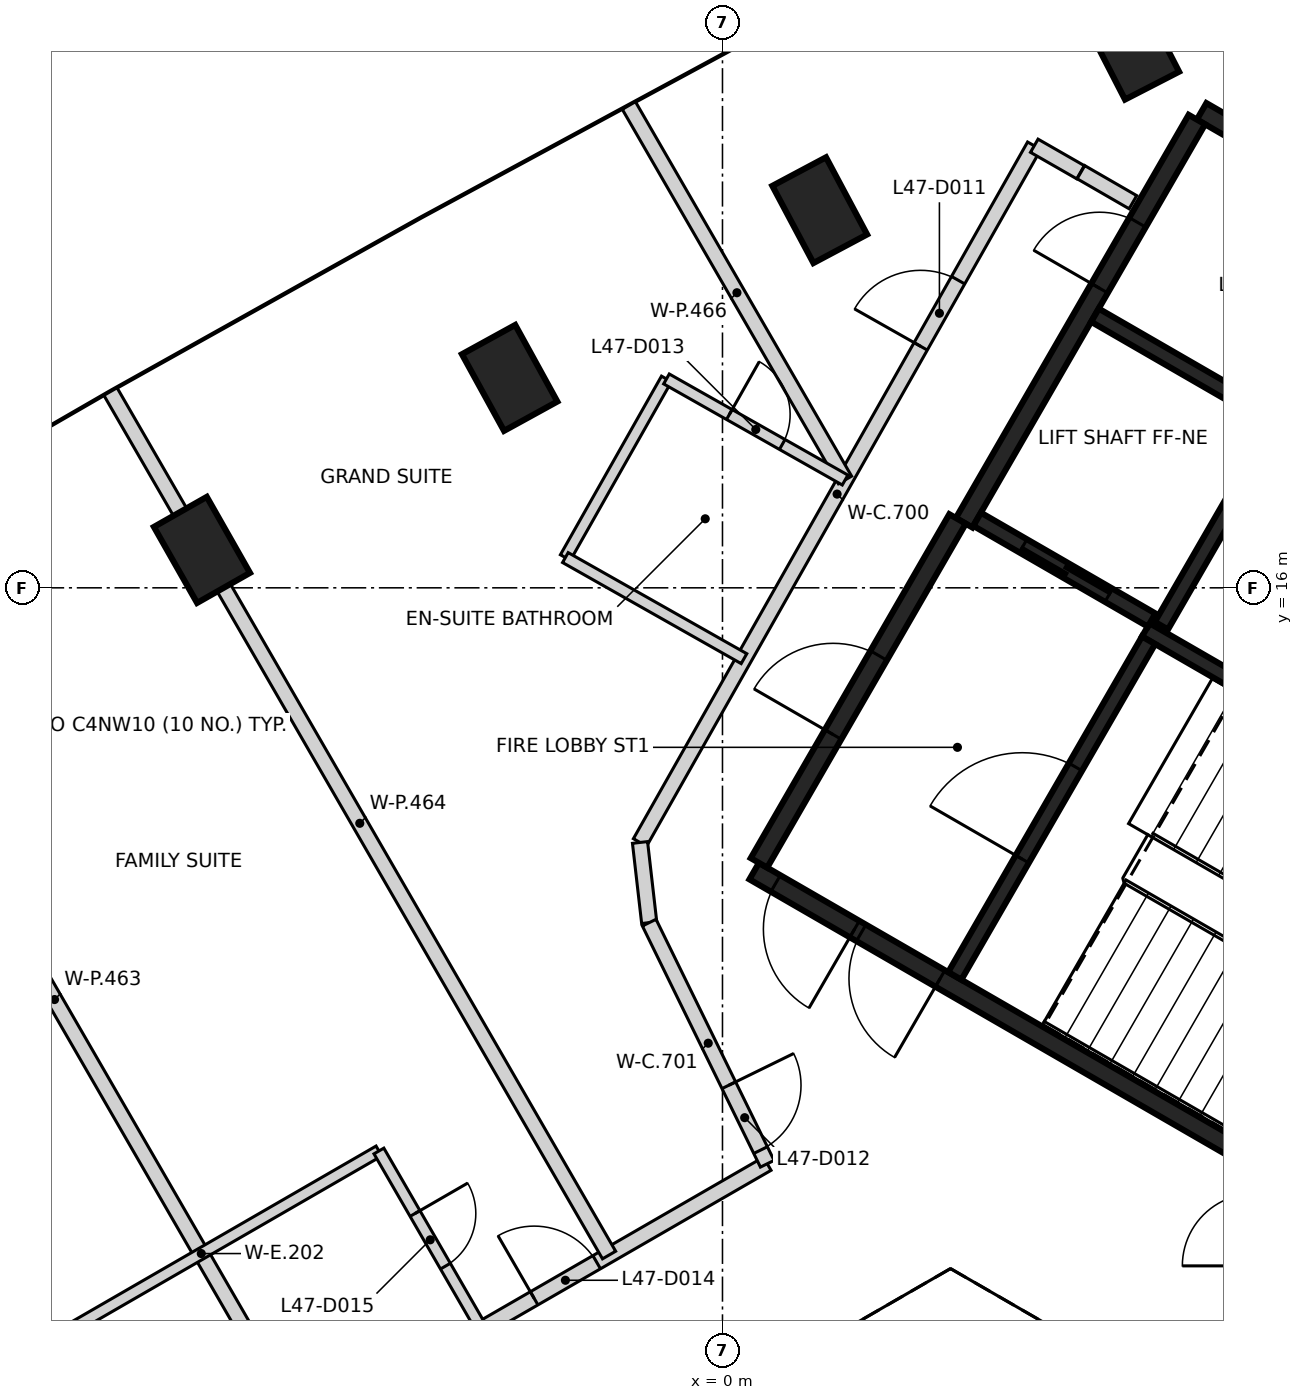
"""IFC4 building model, lengths in metres.
Left out: names, types, materials, properties, quantities, classifications, styles, units other than length and angle.
Written with IfcOpenShell. Run it as: python <this file> out.ifc"""

import sys

from ifc_helpers import new_model, si_unit, direction, frame, frame_2d, origin, origin_2d, place, context, subcontext, project, spatial, rectangle, extrude, element, fill, save


model = new_model("IFC4")
c1 = context("Model", 3, precision=1e-05, world=origin(), true_north=direction((0.0, 1.0)))
c2 = subcontext(c1, "Body", "Model", "MODEL_VIEW")
j1 = project(units=[si_unit("LENGTHUNIT", "METRE"), si_unit("PLANEANGLEUNIT", "RADIAN")], contexts=[c1])
p1 = place(None, origin())
s1 = spatial("IfcSite", under=j1, at=p1, CompositionType="ELEMENT")
p2 = place(p1, origin())
s2 = spatial("IfcBuilding", under=s1, at=p2, CompositionType="ELEMENT")
p3 = place(p2, frame((0.0, 0.0, 190.0)))
s3 = spatial("IfcBuildingStorey", under=s2, at=p3, CompositionType="ELEMENT", Elevation=190.0)
for number, where, z_axis, x_axis in (
    (1, (5.388, 23.118, -0.35), (0.0, 0.0, 1.0), (-0.458, 0.889, 0.0)),
    (2, (1.279, 20.968, -0.35), (0.0, 0.0, 1.0), (-0.47, 0.883, 0.0)),
    (3, (-2.8, 18.762, -0.35), (0.0, 0.0, 1.0), (-0.482, 0.876, 0.0)),
    (4, (-6.848, 16.499, -0.35), (0.0, 0.0, 1.0), (-0.494, 0.87, 0.0)),
):
    element("IfcColumn", number, at=place(p3, frame(where, z_axis=z_axis, x_axis=x_axis)), inside=s3, PredefinedType="COLUMN", context=c2, shape_type="SweptSolid", body=[
        extrude(rectangle(XDim=1.15, YDim=0.8, at=origin_2d()), origin(), (0.0, 0.0, 1.0), 3.6),
    ])
p4 = place(p3, frame((10.42, 6.498, 0.0), z_axis=(0.0, 0.0, 1.0), x_axis=(-0.866021906294, 0.500006057782, 0.0)))
e5 = element("IfcWall", 5, at=p4, inside=s3, PredefinedType="SHEAR", context=c2, shape_type="SweptSolid", body=[
    extrude(rectangle(XDim=11.55, YDim=0.25, at=frame_2d((5.775, 0.0))), origin(), (0.0, 0.0, 1.0), 3.25),
])
p5 = place(p4, frame((10.025, 0.0, 0.0)))
e6 = element("IfcOpeningElement", 6, at=p5, cuts=e5, PredefinedType="OPENING", context=c2, shape_type="SweptSolid", body=[
    extrude(rectangle(XDim=1.2, YDim=2.1, at=frame_2d((0.6, 1.05))), frame((0.0, 0.135, 0.0), z_axis=(0.0, -1.0, 0.0), x_axis=(1.0, 0.0, 0.0)), (0.0, 0.0, 1.0), 0.27),
])
p6 = place(p4, frame((8.725, 0.0, 0.0)))
e7 = element("IfcOpeningElement", 7, at=p6, cuts=e5, PredefinedType="OPENING", context=c2, shape_type="SweptSolid", body=[
    extrude(rectangle(XDim=1.2, YDim=2.1, at=frame_2d((0.6, 1.05))), frame((0.0, 0.135, 0.0), z_axis=(0.0, -1.0, 0.0), x_axis=(1.0, 0.0, 0.0)), (0.0, 0.0, 1.0), 0.27),
])
p7 = place(p3, frame((6.304, 22.269, 0.0), z_axis=(0.0, 0.0, 1.0), x_axis=(0.866022959057, -0.500004234368, 0.0)))
e8 = element("IfcWall", 8, at=p7, inside=s3, PredefinedType="SHEAR", context=c2, shape_type="SweptSolid", body=[
    extrude(rectangle(XDim=8.75, YDim=0.25, at=frame_2d((4.375, 0.0))), origin(), (0.0, 0.0, 1.0), 3.25),
])
p8 = place(p3, frame((3.179, 16.856, 0.0), z_axis=(0.0, 0.0, 1.0), x_axis=(0.500001955336, 0.866024274868, 0.0)))
e9 = element("IfcWall", 9, at=p8, inside=s3, PredefinedType="SHEAR", context=c2, shape_type="SweptSolid", body=[
    extrude(rectangle(XDim=6.125, YDim=0.25, at=frame_2d((3.062, 0.0))), origin(), (0.0, 0.0, 1.0), 3.25),
])
p9 = place(p8, frame((3.563, 0.0, 0.0)))
e10 = element("IfcOpeningElement", 10, at=p9, cuts=e9, PredefinedType="OPENING", context=c2, shape_type="SweptSolid", body=[
    extrude(rectangle(XDim=1.0, YDim=2.1, at=frame_2d((0.5, 1.05))), frame((0.0, 0.135, 0.0), z_axis=(0.0, -1.0, 0.0), x_axis=(1.0, 0.0, 0.0)), (0.0, 0.0, 1.0), 0.27),
])
p10 = place(p3, frame((0.48, 12.381, 0.0), z_axis=(0.0, 0.0, 1.0), x_axis=(0.49999885962, 0.866026062182, 0.0)))
e11 = element("IfcWall", 11, at=p10, inside=s3, PredefinedType="SHEAR", context=c2, shape_type="SweptSolid", body=[
    extrude(rectangle(XDim=5.225, YDim=0.25, at=frame_2d((2.612, 0.0))), origin(), (0.0, 0.0, 1.0), 3.25),
])
p11 = place(p10, frame((1.95, 0.0, 0.0)))
e12 = element("IfcOpeningElement", 12, at=p11, cuts=e11, PredefinedType="OPENING", context=c2, shape_type="SweptSolid", body=[
    extrude(rectangle(XDim=1.2, YDim=2.1, at=frame_2d((0.6, 1.05))), frame((0.0, 0.135, 0.0), z_axis=(0.0, -1.0, 0.0), x_axis=(1.0, 0.0, 0.0)), (0.0, 0.0, 1.0), 0.27),
])
p12 = place(p3, frame((10.743, 12.46, 0.0), z_axis=(0.0, 0.0, 1.0), x_axis=(-0.866018848283, 0.500011354289, 0.0)))
e13 = element("IfcWall", 13, at=p12, inside=s3, PredefinedType="SHEAR", context=c2, shape_type="SweptSolid", body=[
    extrude(rectangle(XDim=5.974, YDim=0.2, at=frame_2d((2.987, 0.0))), origin(), (0.0, 0.0, 1.0), 3.25),
])
p13 = place(p3, frame((3.057, 10.895, 0.0), z_axis=(0.0, 0.0, 1.0), x_axis=(0.500027839223, 0.866009330205, 0.0)))
e14 = element("IfcWall", 14, at=p13, inside=s3, PredefinedType="SHEAR", context=c2, shape_type="SweptSolid", body=[
    extrude(rectangle(XDim=5.098, YDim=0.2, at=frame_2d((2.549, 0.0))), origin(), (0.0, 0.0, 1.0), 3.25),
])
p14 = place(p13, frame((1.774, 0.0, 0.0)))
e15 = element("IfcOpeningElement", 15, at=p14, cuts=e14, PredefinedType="OPENING", context=c2, shape_type="SweptSolid", body=[
    extrude(rectangle(XDim=1.4, YDim=2.1, at=frame_2d((0.7, 1.05))), frame((0.0, 0.11, 0.0), z_axis=(0.0, -1.0, 0.0), x_axis=(1.0, 0.0, 0.0)), (0.0, 0.0, 1.0), 0.22),
])
p15 = place(p3, frame((7.324, 18.187, 0.0), z_axis=(0.0, 0.0, 1.0), x_axis=(-0.499967891604, -0.866043940782, 0.0)))
e16 = element("IfcWall", 16, at=p15, inside=s3, PredefinedType="SHEAR", context=c2, shape_type="SweptSolid", body=[
    extrude(rectangle(XDim=3.1, YDim=0.2, at=frame_2d((1.55, 0.0))), origin(), (0.0, 0.0, 1.0), 3.25),
])
p16 = place(p3, frame((5.646, 15.576, 0.0), z_axis=(0.0, 0.0, 1.0), x_axis=(-0.866018407898, 0.500012117035, 0.0)))
e17 = element("IfcWall", 17, at=p16, inside=s3, PredefinedType="SHEAR", context=c2, shape_type="SweptSolid", body=[
    extrude(rectangle(XDim=2.651, YDim=0.2, at=frame_2d((1.325, 0.0))), origin(), (0.0, 0.0, 1.0), 3.25),
])
p17 = place(p16, frame((0.652, 0.0, 0.0)))
e18 = element("IfcOpeningElement", 18, at=p17, cuts=e17, PredefinedType="OPENING", context=c2, shape_type="SweptSolid", body=[
    extrude(rectangle(XDim=1.3, YDim=2.1, at=frame_2d((0.65, 1.05))), frame((0.0, 0.11, 0.0), z_axis=(0.0, -1.0, 0.0), x_axis=(1.0, 0.0, 0.0)), (0.0, 0.0, 1.0), 0.22),
])
p18 = place(p3, frame((7.196, 18.26, 0.0), z_axis=(0.0, 0.0, 1.0), x_axis=(-0.866018407898, 0.500012117035, 0.0)))
e19 = element("IfcWall", 19, at=p18, inside=s3, PredefinedType="SHEAR", context=c2, shape_type="SweptSolid", body=[
    extrude(rectangle(XDim=2.651, YDim=0.2, at=frame_2d((1.325, 0.0))), origin(), (0.0, 0.0, 1.0), 3.25),
])
p19 = place(p3, frame((-10.652, 1.934, 0.0), z_axis=(0.0, 0.0, 1.0), x_axis=(0.866066882415, 0.499928150021, 0.0)))
e20 = element("IfcWall", 20, at=p19, inside=s3, PredefinedType="PARTITIONING", context=c2, shape_type="SweptSolid", body=[
    extrude(rectangle(XDim=12.98, YDim=0.2, at=frame_2d((6.49, 0.0))), origin(), (0.0, 0.0, 1.0), 3.25),
])
p20 = place(p19, frame((9.439, 0.0, 0.0)))
e21 = element("IfcOpeningElement", 21, at=p20, cuts=e20, PredefinedType="OPENING", context=c2, shape_type="SweptSolid", body=[
    extrude(rectangle(XDim=0.95, YDim=2.1, at=frame_2d((0.475, 1.05))), frame((0.0, 0.11, 0.0), z_axis=(0.0, -1.0, 0.0), x_axis=(1.0, 0.0, 0.0)), (0.0, 0.0, 1.0), 0.22),
])
p21 = place(p19, frame((0.229, 0.0, 0.0)))
e22 = element("IfcOpeningElement", 22, at=p21, cuts=e20, PredefinedType="OPENING", context=c2, shape_type="SweptSolid", body=[
    extrude(rectangle(XDim=0.95, YDim=2.1, at=frame_2d((0.475, 1.05))), frame((0.0, 0.11, 0.0), z_axis=(0.0, -1.0, 0.0), x_axis=(1.0, 0.0, 0.0)), (0.0, 0.0, 1.0), 0.22),
])
p22 = place(p3, frame((-1.085, 12.65, 0.0), z_axis=(0.0, 0.0, 1.0), x_axis=(0.49243456751, 0.870349468157, 0.0)))
e23 = element("IfcWall", 23, at=p22, inside=s3, PredefinedType="PARTITIONING", context=c2, shape_type="SweptSolid", body=[
    extrude(rectangle(XDim=10.531, YDim=0.2, at=frame_2d((5.266, 0.0))), origin(), (0.0, 0.0, 1.0), 3.25),
])
p23 = place(p22, frame((7.499, 0.0, 0.0)))
e24 = element("IfcOpeningElement", 24, at=p23, cuts=e23, PredefinedType="OPENING", context=c2, shape_type="SweptSolid", body=[
    extrude(rectangle(XDim=1.0, YDim=2.1, at=frame_2d((0.5, 1.05))), frame((0.0, 0.11, 0.0), z_axis=(0.0, -1.0, 0.0), x_axis=(1.0, 0.0, 0.0)), (0.0, 0.0, 1.0), 0.22),
])
p24 = place(p3, frame((-1.085, 12.65, 0.0), z_axis=(0.0, 0.0, 1.0), x_axis=(0.113812454263, -0.993502252264, 0.0)))
e25 = element("IfcWall", 25, at=p24, inside=s3, PredefinedType="PARTITIONING", context=c2, shape_type="SweptSolid", body=[
    extrude(rectangle(XDim=1.062, YDim=0.2, at=frame_2d((0.531, 0.0))), origin(), (0.0, 0.0, 1.0), 3.25),
])
p25 = place(p3, frame((-0.964, 11.595, 0.0), z_axis=(0.0, 0.0, 1.0), x_axis=(0.439787800928, -0.898101714816, 0.0)))
e26 = element("IfcWall", 26, at=p25, inside=s3, PredefinedType="PARTITIONING", context=c2, shape_type="SweptSolid", body=[
    extrude(rectangle(XDim=3.532, YDim=0.2, at=frame_2d((1.766, 0.0))), origin(), (0.0, 0.0, 1.0), 3.25),
])
p26 = place(p25, frame((2.382, 0.0, 0.0)))
e27 = element("IfcOpeningElement", 27, at=p26, cuts=e26, PredefinedType="OPENING", context=c2, shape_type="SweptSolid", body=[
    extrude(rectangle(XDim=0.95, YDim=2.1, at=frame_2d((0.475, 1.05))), frame((0.0, 0.11, 0.0), z_axis=(0.0, -1.0, 0.0), x_axis=(1.0, 0.0, 0.0)), (0.0, 0.0, 1.0), 0.22),
])
p27 = place(p3, frame((4.102, 21.816, 0.0), z_axis=(0.0, 0.0, 1.0), x_axis=(0.867664502326, -0.497150189986, 0.0)))
e28 = element("IfcWall", 28, at=p27, inside=s3, PredefinedType="PARTITIONING", context=c2, shape_type="SweptSolid", body=[
    extrude(rectangle(XDim=0.702, YDim=0.2, at=frame_2d((0.351, 0.0))), origin(), (0.0, 0.0, 1.0), 3.25),
])
p28 = place(p3, frame((4.716, 21.468, 0.0), z_axis=(0.0, 0.0, 1.0), x_axis=(0.865912682783, -0.500195187698, 0.0)))
e29 = element("IfcWall", 29, at=p28, inside=s3, PredefinedType="PARTITIONING", context=c2, shape_type="SweptSolid", body=[
    extrude(rectangle(XDim=0.79, YDim=0.2, at=frame_2d((0.395, 0.0))), origin(), (0.0, 0.0, 1.0), 3.25),
])
p29 = place(p3, frame((-12.067, 16.263, 0.0), z_axis=(0.0, 0.0, 1.0), x_axis=(0.500016190239, -0.866016056144, 0.0)))
e30 = element("IfcWall", 30, at=p29, inside=s3, PredefinedType="PARTITIONING", context=c2, shape_type="SweptSolid", body=[
    extrude(rectangle(XDim=13.118, YDim=0.2, at=frame_2d((6.559, 0.0))), origin(), (0.0, 0.0, 1.0), 3.25),
])
p30 = place(p3, frame((-8.052, 18.582, 0.0), z_axis=(0.0, 0.0, 1.0), x_axis=(0.500046266189, -0.86599869034, 0.0)))
e31 = element("IfcWall", 31, at=p30, inside=s3, PredefinedType="PARTITIONING", context=c2, shape_type="SweptSolid", body=[
    extrude(rectangle(XDim=13.118, YDim=0.2, at=frame_2d((6.559, 0.0))), origin(), (0.0, 0.0, 1.0), 3.25),
])
p31 = place(p3, frame((-1.232, 22.345, 0.0), z_axis=(0.0, 0.0, 1.0), x_axis=(0.499942901263, -0.866058367246, 0.0)))
e32 = element("IfcWall", 32, at=p31, inside=s3, PredefinedType="PARTITIONING", context=c2, shape_type="SweptSolid", body=[
    extrude(rectangle(XDim=5.688, YDim=0.2, at=frame_2d((2.844, 0.0))), origin(), (0.0, 0.0, 1.0), 2.35),
])
p32 = place(p3, frame((-9.194, 5.892, 0.0), z_axis=(0.0, 0.0, 1.0), x_axis=(0.8659934935, 0.500055266161, 0.0)))
e33 = element("IfcWall", 33, at=p32, inside=s3, PredefinedType="PARTITIONING", context=c2, shape_type="SweptSolid", body=[
    extrude(rectangle(XDim=5.397, YDim=0.15, at=frame_2d((2.699, 0.0))), origin(), (0.0, 0.0, 1.0), 3.25),
])
p33 = place(p3, frame((-4.52, 8.591, 0.0), z_axis=(0.0, 0.0, 1.0), x_axis=(0.500048589285, -0.86599734893, 0.0)))
e34 = element("IfcWall", 34, at=p33, inside=s3, PredefinedType="PARTITIONING", context=c2, shape_type="SweptSolid", body=[
    extrude(rectangle(XDim=2.7, YDim=0.15, at=frame_2d((1.35, 0.0))), origin(), (0.0, 0.0, 1.0), 3.25),
])
p34 = place(p33, frame((0.95, 0.0, 0.0)))
e35 = element("IfcOpeningElement", 35, at=p34, cuts=e34, PredefinedType="OPENING", context=c2, shape_type="SweptSolid", body=[
    extrude(rectangle(XDim=0.8, YDim=2.1, at=frame_2d((0.4, 1.05))), frame((0.0, 0.085, 0.0), z_axis=(0.0, -1.0, 0.0), x_axis=(1.0, 0.0, 0.0)), (0.0, 0.0, 1.0), 0.17),
])
p35 = place(p3, frame((-2.067, 16.398, 0.0), z_axis=(0.0, 0.0, 1.0), x_axis=(0.492483230042, 0.870321933613, 0.0)))
e36 = element("IfcWall", 36, at=p35, inside=s3, PredefinedType="PARTITIONING", context=c2, shape_type="SweptSolid", body=[
    extrude(rectangle(XDim=2.7, YDim=0.15, at=frame_2d((1.35, 0.0))), origin(), (0.0, 0.0, 1.0), 3.25),
])
p36 = place(p3, frame((-2.067, 16.398, 0.0), z_axis=(0.0, 0.0, 1.0), x_axis=(0.870300002118, -0.492521985614, 0.0)))
e37 = element("IfcWall", 37, at=p36, inside=s3, PredefinedType="PARTITIONING", context=c2, shape_type="SweptSolid", body=[
    extrude(rectangle(XDim=2.7, YDim=0.15, at=frame_2d((1.35, 0.0))), origin(), (0.0, 0.0, 1.0), 3.25),
])
p37 = place(p3, frame((-0.737, 18.748, 0.0), z_axis=(0.0, 0.0, 1.0), x_axis=(0.870283179633, -0.492551710227, 0.0)))
e38 = element("IfcWall", 38, at=p37, inside=s3, PredefinedType="PARTITIONING", context=c2, shape_type="SweptSolid", body=[
    extrude(rectangle(XDim=2.7, YDim=0.15, at=frame_2d((1.35, 0.0))), origin(), (0.0, 0.0, 1.0), 3.25),
])
p38 = place(p37, frame((0.95, 0.0, 0.0)))
e39 = element("IfcOpeningElement", 39, at=p38, cuts=e38, PredefinedType="OPENING", context=c2, shape_type="SweptSolid", body=[
    extrude(rectangle(XDim=0.8, YDim=2.1, at=frame_2d((0.4, 1.05))), frame((0.0, 0.085, 0.0), z_axis=(0.0, -1.0, 0.0), x_axis=(1.0, 0.0, 0.0)), (0.0, 0.0, 1.0), 0.17),
])
p39 = place(p17, origin())
e40 = element("IfcDoor", 40, at=p39, inside=s3, OperationType="SLIDING_TO_RIGHT", PredefinedType="DOOR", context=c2, shape_type="SweptSolid", body=[
    extrude(rectangle(XDim=1.3, YDim=2.1, at=frame_2d((0.65, 1.05))), frame((0.0, 0.025, 0.0), z_axis=(0.0, -1.0, 0.0), x_axis=(1.0, 0.0, 0.0)), (0.0, 0.0, 1.0), 0.05),
])
fill(e18, e40)
p40 = place(p9, origin())
e41 = element("IfcDoor", 41, at=p40, inside=s3, OperationType="SINGLE_SWING_LEFT", PredefinedType="DOOR", context=c2, shape_type="SweptSolid", body=[
    extrude(rectangle(XDim=1.0, YDim=2.1, at=frame_2d((0.5, 1.05))), frame((0.0, 0.025, 0.0), z_axis=(0.0, -1.0, 0.0), x_axis=(1.0, 0.0, 0.0)), (0.0, 0.0, 1.0), 0.05),
])
fill(e10, e41)
p41 = place(p5, origin())
e42 = element("IfcDoor", 42, at=p41, inside=s3, OperationType="SINGLE_SWING_LEFT", PredefinedType="DOOR", context=c2, shape_type="SweptSolid", body=[
    extrude(rectangle(XDim=1.2, YDim=2.1, at=frame_2d((0.6, 1.05))), frame((0.0, 0.025, 0.0), z_axis=(0.0, -1.0, 0.0), x_axis=(1.0, 0.0, 0.0)), (0.0, 0.0, 1.0), 0.05),
])
fill(e6, e42)
p42 = place(p6, origin())
e43 = element("IfcDoor", 43, at=p42, inside=s3, OperationType="SINGLE_SWING_RIGHT", PredefinedType="DOOR", context=c2, shape_type="SweptSolid", body=[
    extrude(rectangle(XDim=1.2, YDim=2.1, at=frame_2d((0.6, 1.05))), frame((0.0, 0.025, 0.0), z_axis=(0.0, -1.0, 0.0), x_axis=(1.0, 0.0, 0.0)), (0.0, 0.0, 1.0), 0.05),
])
fill(e7, e43)
p43 = place(p14, origin())
e44 = element("IfcDoor", 44, at=p43, inside=s3, OperationType="SINGLE_SWING_RIGHT", PredefinedType="DOOR", context=c2, shape_type="SweptSolid", body=[
    extrude(rectangle(XDim=1.4, YDim=2.1, at=frame_2d((0.7, 1.05))), frame((0.0, 0.025, 0.0), z_axis=(0.0, -1.0, 0.0), x_axis=(1.0, 0.0, 0.0)), (0.0, 0.0, 1.0), 0.05),
])
fill(e15, e44)
p44 = place(p11, origin())
e45 = element("IfcDoor", 45, at=p44, inside=s3, OperationType="SINGLE_SWING_LEFT", PredefinedType="DOOR", context=c2, shape_type="SweptSolid", body=[
    extrude(rectangle(XDim=1.2, YDim=2.1, at=frame_2d((0.6, 1.05))), frame((0.0, 0.025, 0.0), z_axis=(0.0, -1.0, 0.0), x_axis=(1.0, 0.0, 0.0)), (0.0, 0.0, 1.0), 0.05),
])
fill(e12, e45)
p45 = place(p23, frame((1.0, 0.0, 0.0), z_axis=(0.0, 0.0, 1.0), x_axis=(-1.0, 0.0, 0.0)))
e46 = element("IfcDoor", 46, at=p45, inside=s3, OperationType="SINGLE_SWING_LEFT", PredefinedType="DOOR", context=c2, shape_type="SweptSolid", body=[
    extrude(rectangle(XDim=1.0, YDim=2.1, at=frame_2d((0.5, 1.05))), frame((0.0, 0.025, 0.0), z_axis=(0.0, -1.0, 0.0), x_axis=(1.0, 0.0, 0.0)), (0.0, 0.0, 1.0), 0.05),
])
fill(e24, e46)
p46 = place(p26, frame((0.95, 0.0, 0.0), z_axis=(0.0, 0.0, 1.0), x_axis=(-1.0, 0.0, 0.0)))
e47 = element("IfcDoor", 47, at=p46, inside=s3, OperationType="SINGLE_SWING_LEFT", PredefinedType="DOOR", context=c2, shape_type="SweptSolid", body=[
    extrude(rectangle(XDim=0.95, YDim=2.1, at=frame_2d((0.475, 1.05))), frame((0.0, 0.025, 0.0), z_axis=(0.0, -1.0, 0.0), x_axis=(1.0, 0.0, 0.0)), (0.0, 0.0, 1.0), 0.05),
])
fill(e27, e47)
p47 = place(p38, frame((0.8, 0.0, 0.0), z_axis=(0.0, 0.0, 1.0), x_axis=(-1.0, 0.0, 0.0)))
e48 = element("IfcDoor", 48, at=p47, inside=s3, OperationType="SINGLE_SWING_LEFT", PredefinedType="DOOR", context=c2, shape_type="SweptSolid", body=[
    extrude(rectangle(XDim=0.8, YDim=2.1, at=frame_2d((0.4, 1.05))), frame((0.0, 0.025, 0.0), z_axis=(0.0, -1.0, 0.0), x_axis=(1.0, 0.0, 0.0)), (0.0, 0.0, 1.0), 0.05),
])
fill(e39, e48)
p48 = place(p20, origin())
e49 = element("IfcDoor", 49, at=p48, inside=s3, OperationType="SINGLE_SWING_LEFT", PredefinedType="DOOR", context=c2, shape_type="SweptSolid", body=[
    extrude(rectangle(XDim=0.95, YDim=2.1, at=frame_2d((0.475, 1.05))), frame((0.0, 0.025, 0.0), z_axis=(0.0, -1.0, 0.0), x_axis=(1.0, 0.0, 0.0)), (0.0, 0.0, 1.0), 0.05),
])
fill(e21, e49)
p49 = place(p34, frame((0.8, 0.0, 0.0), z_axis=(0.0, 0.0, 1.0), x_axis=(-1.0, 0.0, 0.0)))
e50 = element("IfcDoor", 50, at=p49, inside=s3, OperationType="SINGLE_SWING_LEFT", PredefinedType="DOOR", context=c2, shape_type="SweptSolid", body=[
    extrude(rectangle(XDim=0.8, YDim=2.1, at=frame_2d((0.4, 1.05))), frame((0.0, 0.025, 0.0), z_axis=(0.0, -1.0, 0.0), x_axis=(1.0, 0.0, 0.0)), (0.0, 0.0, 1.0), 0.05),
])
fill(e35, e50)
save(model, sys.argv[1])
